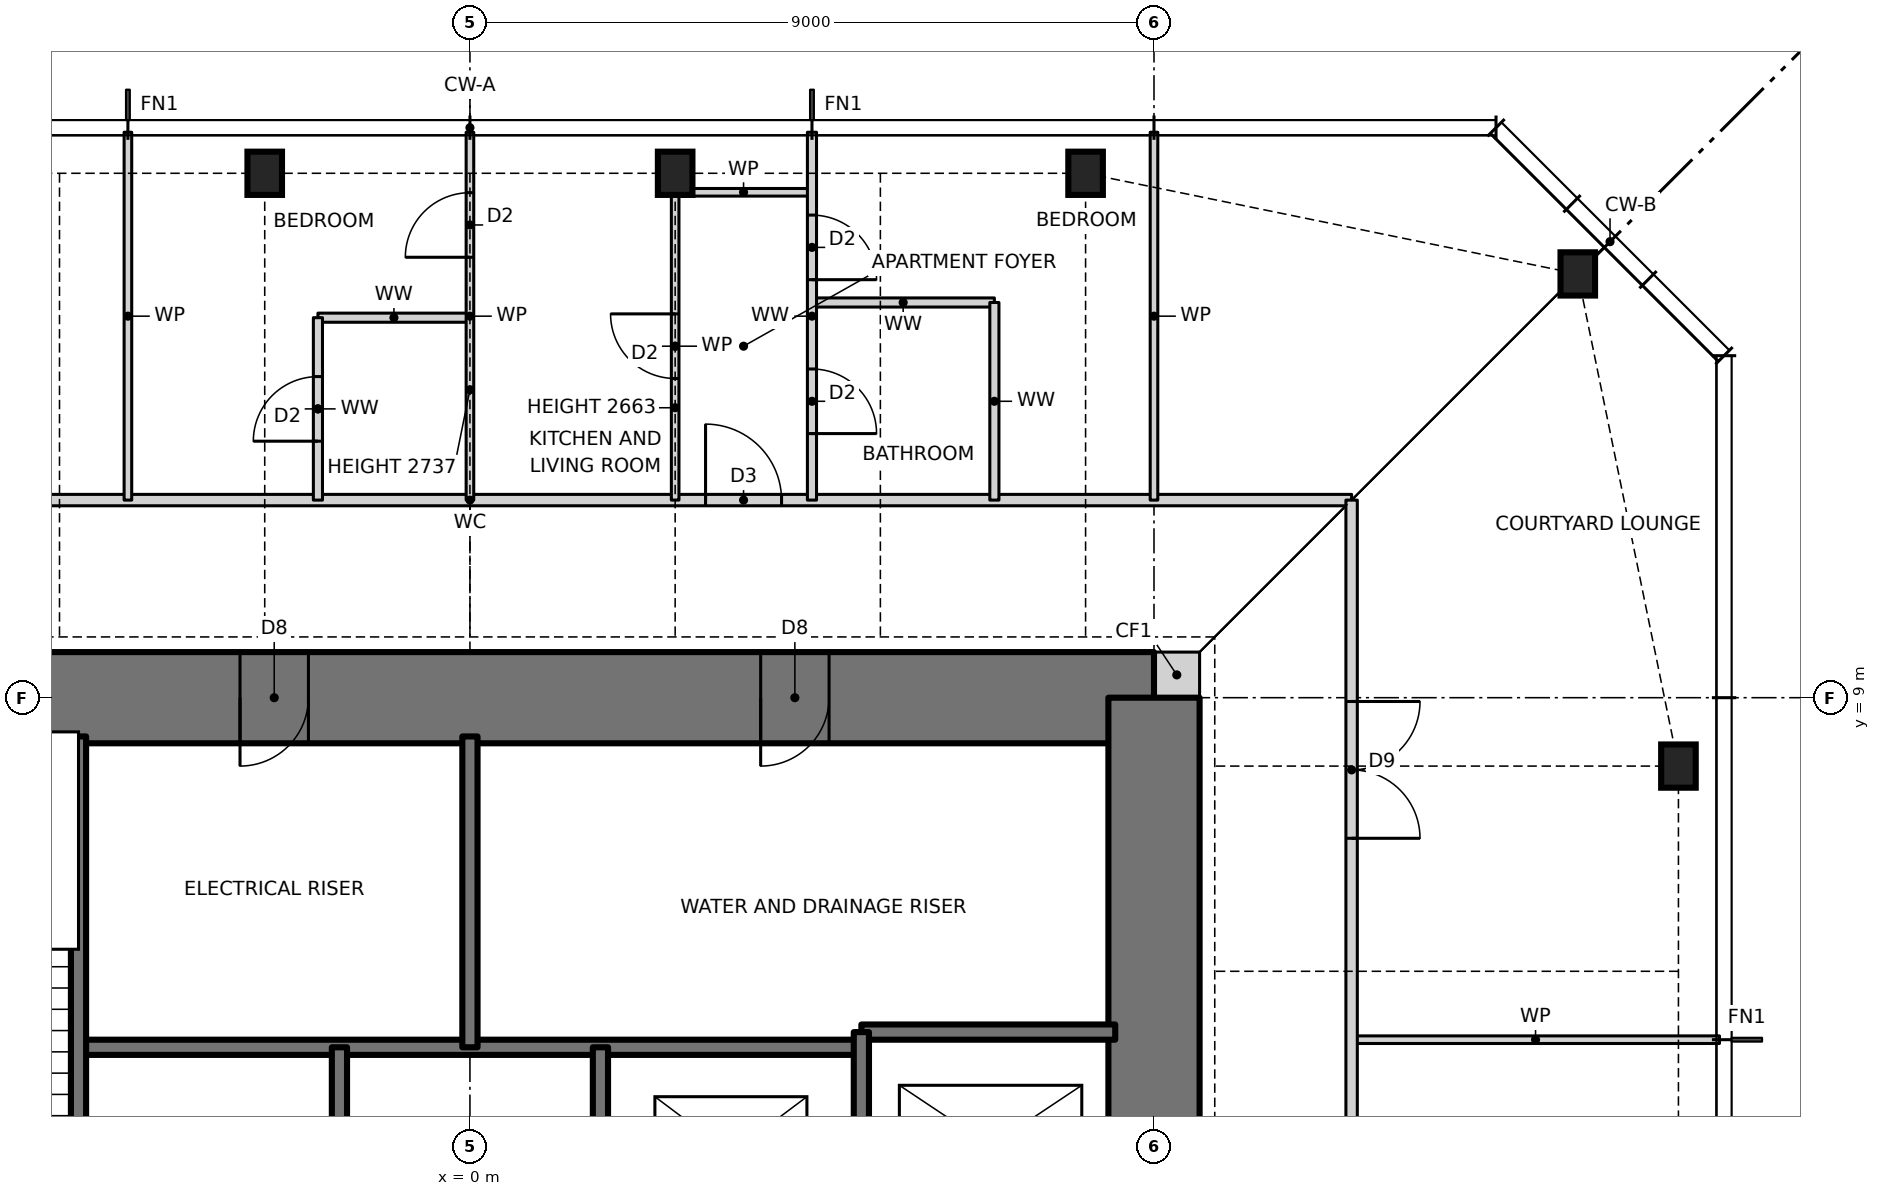
"""IFC4 building model, lengths in metres.
Left out: names, types, materials, properties, quantities, classifications, styles, units other than length and angle.
Written with IfcOpenShell. Run it as: python <this file> out.ifc"""

import sys

from ifc_helpers import new_model, si_unit, direction, frame, frame_2d, origin, origin_2d, place, context, subcontext, project, spatial, rectangle, i_section, extrude, element, fill, save


model = new_model("IFC4")
c1 = context("Model", 3, precision=1e-05, world=origin(), true_north=direction((0.0, 1.0)))
c2 = subcontext(c1, "Body", "Model", "MODEL_VIEW")
j1 = project(units=[si_unit("LENGTHUNIT", "METRE"), si_unit("PLANEANGLEUNIT", "RADIAN")], contexts=[c1])
p1 = place(None, origin())
s1 = spatial("IfcSite", under=j1, at=p1, CompositionType="ELEMENT")
p2 = place(p1, origin())
s2 = spatial("IfcBuilding", under=s1, at=p2, CompositionType="ELEMENT")
p3 = place(p2, frame((0.0, 0.0, 257.0)))
s3 = spatial("IfcBuildingStorey", under=s2, at=p3, CompositionType="ELEMENT", Elevation=257.0)
for number, where, z_axis, x_axis in (
    (1, (15.9, 8.1, 0.0), (0.0, 0.0, 1.0), (1.0, 0.0, 0.0)),
    (2, (14.576, 14.576, 0.0), (0.0, 0.0, 1.0), (1.0, 0.0, 0.0)),
    (3, (8.1, 15.9, 0.0), (0.0, 0.0, 1.0), (1.0, 0.0, 0.0)),
    (4, (2.7, 15.9, 0.0), (0.0, 0.0, 1.0), (1.0, 0.0, 0.0)),
    (5, (-2.7, 15.9, 0.0), (0.0, 0.0, 1.0), (1.0, 0.0, 0.0)),
):
    element("IfcColumn", number, at=place(p3, frame(where, z_axis=z_axis, x_axis=x_axis)), inside=s3, PredefinedType="COLUMN", context=c2, shape_type="SweptSolid", body=[
        extrude(i_section(OverallWidth=0.455, OverallDepth=0.569, WebThickness=0.078, FlangeThickness=0.125, at=origin_2d()), origin(), (0.0, 0.0, 1.0), 3.5),
    ])
p4 = place(p3, frame((9.0, 9.3, 0.0), z_axis=(0.0, 0.0, 1.0), x_axis=(1.0, 0.0, 0.0)))
e6 = element("IfcWall", 6, at=p4, inside=s3, PredefinedType="SOLIDWALL", context=c2, shape_type="SweptSolid", body=[
    extrude(rectangle(XDim=0.6, YDim=0.6, at=frame_2d((0.3, 0.0))), origin(), (0.0, 0.0, 1.0), 3.5),
])
p5 = place(p3, frame((9.0, 9.0, 0.0), z_axis=(0.0, 0.0, 1.0), x_axis=(-1.0, 0.0, 0.0)))
e7 = element("IfcWall", 7, at=p5, inside=s3, PredefinedType="SHEAR", context=c2, shape_type="SweptSolid", body=[
    extrude(rectangle(XDim=18.0, YDim=1.2, at=frame_2d((9.0, 0.0))), origin(), (0.0, 0.0, 1.0), 3.5),
])
p6 = place(p5, frame((11.125, 0.0, 0.0)))
e8 = element("IfcOpeningElement", 8, at=p6, cuts=e7, PredefinedType="OPENING", context=c2, shape_type="SweptSolid", body=[
    extrude(rectangle(XDim=0.9, YDim=2.1, at=frame_2d((0.45, 1.05))), frame((0.0, 0.61, 0.0), z_axis=(0.0, -1.0, 0.0), x_axis=(1.0, 0.0, 0.0)), (0.0, 0.0, 1.0), 1.22),
])
p7 = place(p5, frame((4.275, 0.0, 0.0)))
e9 = element("IfcOpeningElement", 9, at=p7, cuts=e7, PredefinedType="OPENING", context=c2, shape_type="SweptSolid", body=[
    extrude(rectangle(XDim=0.9, YDim=2.1, at=frame_2d((0.45, 1.05))), frame((0.0, 0.61, 0.0), z_axis=(0.0, -1.0, 0.0), x_axis=(1.0, 0.0, 0.0)), (0.0, 0.0, 1.0), 1.22),
])
p8 = place(p3, frame((9.0, -9.0, 0.0), z_axis=(0.0, 0.0, 1.0), x_axis=(0.0, 1.0, 0.0)))
e10 = element("IfcWall", 10, at=p8, inside=s3, PredefinedType="SHEAR", context=c2, shape_type="SweptSolid", body=[
    extrude(rectangle(XDim=18.0, YDim=1.2, at=frame_2d((9.0, 0.0))), origin(), (0.0, 0.0, 1.0), 3.5),
])
p9 = place(p8, frame((8.5, 0.0, 0.0)))
e11 = element("IfcOpeningElement", 11, at=p9, cuts=e10, PredefinedType="OPENING", context=c2, shape_type="SweptSolid", body=[
    extrude(rectangle(XDim=1.0, YDim=2.1, at=frame_2d((0.5, 1.05))), frame((0.0, 0.61, 0.0), z_axis=(0.0, -1.0, 0.0), x_axis=(1.0, 0.0, 0.0)), (0.0, 0.0, 1.0), 1.22),
])
p10 = place(p3, frame((-5.15, 4.4, 0.0), z_axis=(0.0, 0.0, 1.0), x_axis=(1.0, 0.0, 0.0)))
e12 = element("IfcWall", 12, at=p10, inside=s3, PredefinedType="SOLIDWALL", context=c2, shape_type="SweptSolid", body=[
    extrude(rectangle(XDim=10.3, YDim=0.2, at=frame_2d((5.15, 0.0))), origin(), (0.0, 0.0, 1.0), 3.5),
])
p11 = place(p3, frame((11.6, 4.5, 0.0), z_axis=(0.0, 0.0, 1.0), x_axis=(1.0, 0.0, 0.0)))
e13 = element("IfcWall", 13, at=p11, inside=s3, PredefinedType="PARTITIONING", context=c2, shape_type="SweptSolid", body=[
    extrude(rectangle(XDim=4.84, YDim=0.1, at=frame_2d((2.42, 0.0))), origin(), (0.0, 0.0, 1.0), 3.27),
])
p12 = place(p3, frame((5.15, 4.6, 0.0), z_axis=(0.0, 0.0, 1.0), x_axis=(1.0, 0.0, 0.0)))
e14 = element("IfcWall", 14, at=p12, inside=s3, PredefinedType="SOLIDWALL", context=c2, shape_type="SweptSolid", body=[
    extrude(rectangle(XDim=3.34, YDim=0.2, at=frame_2d((1.67, 0.0))), origin(), (0.0, 0.0, 1.0), 3.5),
])
p13 = place(p3, frame((-11.6, 11.6, 0.0), z_axis=(0.0, 0.0, 1.0), x_axis=(1.0, 0.0, 0.0)))
e15 = element("IfcWall", 15, at=p13, inside=s3, PredefinedType="PARTITIONING", context=c2, shape_type="SweptSolid", body=[
    extrude(rectangle(XDim=23.2, YDim=0.15, at=frame_2d((11.6, 0.0))), origin(), (0.0, 0.0, 1.0), 3.27),
])
p14 = place(p13, frame((14.7, 0.0, 0.0)))
e16 = element("IfcOpeningElement", 16, at=p14, cuts=e15, PredefinedType="OPENING", context=c2, shape_type="SweptSolid", body=[
    extrude(rectangle(XDim=1.0, YDim=2.1, at=frame_2d((0.5, 1.05))), frame((0.0, 0.085, 0.0), z_axis=(0.0, -1.0, 0.0), x_axis=(1.0, 0.0, 0.0)), (0.0, 0.0, 1.0), 0.17),
])
p15 = place(p13, frame((2.65, 0.0, 0.0)))
e17 = element("IfcOpeningElement", 17, at=p15, cuts=e15, PredefinedType="OPENING", context=c2, shape_type="SweptSolid", body=[
    extrude(rectangle(XDim=1.8, YDim=2.1, at=frame_2d((0.9, 1.05))), frame((0.0, 0.085, 0.0), z_axis=(0.0, -1.0, 0.0), x_axis=(1.0, 0.0, 0.0)), (0.0, 0.0, 1.0), 0.17),
])
p16 = place(p3, frame((-2.0, 14.0, 0.0), z_axis=(0.0, 0.0, 1.0), x_axis=(1.0, 0.0, 0.0)))
e18 = element("IfcWall", 18, at=p16, inside=s3, PredefinedType="PARTITIONING", context=c2, shape_type="SweptSolid", body=[
    extrude(rectangle(XDim=2.0, YDim=0.12, at=frame_2d((1.0, 0.0))), origin(), (0.0, 0.0, 1.0), 3.27),
])
p17 = place(p3, frame((4.5, 14.2, 0.0), z_axis=(0.0, 0.0, 1.0), x_axis=(1.0, 0.0, 0.0)))
e19 = element("IfcWall", 19, at=p17, inside=s3, PredefinedType="PARTITIONING", context=c2, shape_type="SweptSolid", body=[
    extrude(rectangle(XDim=2.4, YDim=0.12, at=frame_2d((1.2, 0.0))), origin(), (0.0, 0.0, 1.0), 3.27),
])
p18 = place(p3, frame((2.7, 15.65, 0.0), z_axis=(0.0, 0.0, 1.0), x_axis=(1.0, 0.0, 0.0)))
e20 = element("IfcWall", 20, at=p18, inside=s3, PredefinedType="PARTITIONING", context=c2, shape_type="SweptSolid", body=[
    extrude(rectangle(XDim=1.8, YDim=0.1, at=frame_2d((0.9, 0.0))), origin(), (0.0, 0.0, 1.0), 3.27),
])
p19 = place(p3, frame((11.6, -11.6, 0.0), z_axis=(0.0, 0.0, 1.0), x_axis=(0.0, 1.0, 0.0)))
e21 = element("IfcWall", 21, at=p19, inside=s3, PredefinedType="PARTITIONING", context=c2, shape_type="SweptSolid", body=[
    extrude(rectangle(XDim=23.2, YDim=0.15, at=frame_2d((11.6, 0.0))), origin(), (0.0, 0.0, 1.0), 3.27),
])
p20 = place(p19, frame((5.55, 0.0, 0.0)))
e22 = element("IfcOpeningElement", 22, at=p20, cuts=e21, PredefinedType="OPENING", context=c2, shape_type="SweptSolid", body=[
    extrude(rectangle(XDim=1.0, YDim=2.1, at=frame_2d((0.5, 1.05))), frame((0.0, 0.085, 0.0), z_axis=(0.0, -1.0, 0.0), x_axis=(1.0, 0.0, 0.0)), (0.0, 0.0, 1.0), 0.17),
])
p21 = place(p19, frame((7.65, 0.0, 0.0)))
e23 = element("IfcOpeningElement", 23, at=p21, cuts=e21, PredefinedType="OPENING", context=c2, shape_type="SweptSolid", body=[
    extrude(rectangle(XDim=1.0, YDim=2.1, at=frame_2d((0.5, 1.05))), frame((0.0, 0.085, 0.0), z_axis=(0.0, -1.0, 0.0), x_axis=(1.0, 0.0, 0.0)), (0.0, 0.0, 1.0), 0.17),
])
p22 = place(p19, frame((12.95, 0.0, 0.0)))
e24 = element("IfcOpeningElement", 24, at=p22, cuts=e21, PredefinedType="OPENING", context=c2, shape_type="SweptSolid", body=[
    extrude(rectangle(XDim=1.8, YDim=2.1, at=frame_2d((0.9, 1.05))), frame((0.0, 0.085, 0.0), z_axis=(0.0, -1.0, 0.0), x_axis=(1.0, 0.0, 0.0)), (0.0, 0.0, 1.0), 0.17),
])
p23 = place(p19, frame((18.75, 0.0, 0.0)))
e25 = element("IfcOpeningElement", 25, at=p23, cuts=e21, PredefinedType="OPENING", context=c2, shape_type="SweptSolid", body=[
    extrude(rectangle(XDim=1.8, YDim=2.1, at=frame_2d((0.9, 1.05))), frame((0.0, 0.085, 0.0), z_axis=(0.0, -1.0, 0.0), x_axis=(1.0, 0.0, 0.0)), (0.0, 0.0, 1.0), 0.17),
])
p24 = place(p3, frame((9.0, 11.6, 0.0), z_axis=(0.0, 0.0, 1.0), x_axis=(0.0, 1.0, 0.0)))
e26 = element("IfcWall", 26, at=p24, inside=s3, PredefinedType="PARTITIONING", context=c2, shape_type="SweptSolid", body=[
    extrude(rectangle(XDim=4.84, YDim=0.1, at=frame_2d((2.42, 0.0))), origin(), (0.0, 0.0, 1.0), 3.27),
])
p25 = place(p3, frame((6.9, 11.6, 0.0), z_axis=(0.0, 0.0, 1.0), x_axis=(0.0, 1.0, 0.0)))
e27 = element("IfcWall", 27, at=p25, inside=s3, PredefinedType="PARTITIONING", context=c2, shape_type="SweptSolid", body=[
    extrude(rectangle(XDim=2.6, YDim=0.12, at=frame_2d((1.3, 0.0))), origin(), (0.0, 0.0, 1.0), 3.27),
])
p26 = place(p3, frame((5.15, -8.49, 0.0), z_axis=(0.0, 0.0, 1.0), x_axis=(0.0, 1.0, 0.0)))
e28 = element("IfcWall", 28, at=p26, inside=s3, PredefinedType="SOLIDWALL", context=c2, shape_type="SweptSolid", body=[
    extrude(rectangle(XDim=13.09, YDim=0.2, at=frame_2d((6.545, 0.0))), origin(), (0.0, 0.0, 1.0), 3.5),
])
p27 = place(p26, frame((7.89, 0.0, 0.0)))
e29 = element("IfcOpeningElement", 29, at=p27, cuts=e28, PredefinedType="OPENING", context=c2, shape_type="SweptSolid", body=[
    extrude(rectangle(XDim=1.2, YDim=2.1, at=frame_2d((0.6, 1.05))), frame((0.0, 0.11, 0.0), z_axis=(0.0, -1.0, 0.0), x_axis=(1.0, 0.0, 0.0)), (0.0, 0.0, 1.0), 0.22),
])
p28 = place(p3, frame((4.5, 11.6, 0.0), z_axis=(0.0, 0.0, 1.0), x_axis=(0.0, 1.0, 0.0)))
e30 = element("IfcWall", 30, at=p28, inside=s3, PredefinedType="PARTITIONING", context=c2, shape_type="SweptSolid", body=[
    extrude(rectangle(XDim=4.84, YDim=0.12, at=frame_2d((2.42, 0.0))), origin(), (0.0, 0.0, 1.0), 3.27),
])
p29 = place(p28, frame((2.9, 0.0, 0.0)))
e31 = element("IfcOpeningElement", 31, at=p29, cuts=e30, PredefinedType="OPENING", context=c2, shape_type="SweptSolid", body=[
    extrude(rectangle(XDim=0.85, YDim=2.1, at=frame_2d((0.425, 1.05))), frame((0.0, 0.07, 0.0), z_axis=(0.0, -1.0, 0.0), x_axis=(1.0, 0.0, 0.0)), (0.0, 0.0, 1.0), 0.14),
])
p30 = place(p28, frame((0.875, 0.0, 0.0)))
e32 = element("IfcOpeningElement", 32, at=p30, cuts=e30, PredefinedType="OPENING", context=c2, shape_type="SweptSolid", body=[
    extrude(rectangle(XDim=0.85, YDim=2.1, at=frame_2d((0.425, 1.05))), frame((0.0, 0.07, 0.0), z_axis=(0.0, -1.0, 0.0), x_axis=(1.0, 0.0, 0.0)), (0.0, 0.0, 1.0), 0.14),
])
p31 = place(p3, frame((2.7, 11.6, 0.0), z_axis=(0.0, 0.0, 1.0), x_axis=(0.0, 1.0, 0.0)))
e33 = element("IfcWall", 33, at=p31, inside=s3, PredefinedType="PARTITIONING", context=c2, shape_type="SweptSolid", body=[
    extrude(rectangle(XDim=4.05, YDim=0.1, at=frame_2d((2.025, 0.0))), origin(), (0.0, 0.0, 1.0), 2.663),
])
p32 = place(p31, frame((1.6, 0.0, 0.0)))
e34 = element("IfcOpeningElement", 34, at=p32, cuts=e33, PredefinedType="OPENING", context=c2, shape_type="SweptSolid", body=[
    extrude(rectangle(XDim=0.85, YDim=2.1, at=frame_2d((0.425, 1.05))), frame((0.0, 0.06, 0.0), z_axis=(0.0, -1.0, 0.0), x_axis=(1.0, 0.0, 0.0)), (0.0, 0.0, 1.0), 0.12),
])
p33 = place(p3, frame((1.717, 1.6, 0.0), z_axis=(0.0, 0.0, 1.0), x_axis=(0.0, 1.0, 0.0)))
e35 = element("IfcWall", 35, at=p33, inside=s3, PredefinedType="SOLIDWALL", context=c2, shape_type="SweptSolid", body=[
    extrude(rectangle(XDim=2.8, YDim=0.2, at=frame_2d((1.4, 0.0))), origin(), (0.0, 0.0, 1.0), 3.5),
])
p34 = place(p3, frame((0.0, 4.4, 0.0), z_axis=(0.0, 0.0, 1.0), x_axis=(0.0, 1.0, 0.0)))
e36 = element("IfcWall", 36, at=p34, inside=s3, PredefinedType="SOLIDWALL", context=c2, shape_type="SweptSolid", body=[
    extrude(rectangle(XDim=4.09, YDim=0.2, at=frame_2d((2.045, 0.0))), origin(), (0.0, 0.0, 1.0), 3.5),
])
p35 = place(p3, frame((0.0, 11.6, 0.0), z_axis=(0.0, 0.0, 1.0), x_axis=(0.0, 1.0, 0.0)))
e37 = element("IfcWall", 37, at=p35, inside=s3, PredefinedType="PARTITIONING", context=c2, shape_type="SweptSolid", body=[
    extrude(rectangle(XDim=4.84, YDim=0.1, at=frame_2d((2.42, 0.0))), origin(), (0.0, 0.0, 1.0), 2.737),
])
p36 = place(p35, frame((3.195, 0.0, 0.0)))
e38 = element("IfcOpeningElement", 38, at=p36, cuts=e37, PredefinedType="OPENING", context=c2, shape_type="SweptSolid", body=[
    extrude(rectangle(XDim=0.85, YDim=2.1, at=frame_2d((0.425, 1.05))), frame((0.0, 0.06, 0.0), z_axis=(0.0, -1.0, 0.0), x_axis=(1.0, 0.0, 0.0)), (0.0, 0.0, 1.0), 0.12),
])
p37 = place(p3, frame((-1.717, 1.6, 0.0), z_axis=(0.0, 0.0, 1.0), x_axis=(0.0, 1.0, 0.0)))
e39 = element("IfcWall", 39, at=p37, inside=s3, PredefinedType="SOLIDWALL", context=c2, shape_type="SweptSolid", body=[
    extrude(rectangle(XDim=2.8, YDim=0.2, at=frame_2d((1.4, 0.0))), origin(), (0.0, 0.0, 1.0), 3.5),
])
p38 = place(p3, frame((-2.0, 11.6, 0.0), z_axis=(0.0, 0.0, 1.0), x_axis=(0.0, 1.0, 0.0)))
e40 = element("IfcWall", 40, at=p38, inside=s3, PredefinedType="PARTITIONING", context=c2, shape_type="SweptSolid", body=[
    extrude(rectangle(XDim=2.4, YDim=0.12, at=frame_2d((1.2, 0.0))), origin(), (0.0, 0.0, 1.0), 3.27),
])
p39 = place(p38, frame((0.775, 0.0, 0.0)))
e41 = element("IfcOpeningElement", 41, at=p39, cuts=e40, PredefinedType="OPENING", context=c2, shape_type="SweptSolid", body=[
    extrude(rectangle(XDim=0.85, YDim=2.1, at=frame_2d((0.425, 1.05))), frame((0.0, 0.07, 0.0), z_axis=(0.0, -1.0, 0.0), x_axis=(1.0, 0.0, 0.0)), (0.0, 0.0, 1.0), 0.14),
])
p40 = place(p3, frame((-4.5, 11.6, 0.0), z_axis=(0.0, 0.0, 1.0), x_axis=(0.0, 1.0, 0.0)))
e42 = element("IfcWall", 42, at=p40, inside=s3, PredefinedType="PARTITIONING", context=c2, shape_type="SweptSolid", body=[
    extrude(rectangle(XDim=4.84, YDim=0.1, at=frame_2d((2.42, 0.0))), origin(), (0.0, 0.0, 1.0), 3.27),
])
p41 = place(p3, frame((-5.15, 1.6, 0.0), z_axis=(0.0, 0.0, 1.0), x_axis=(0.0, 1.0, 0.0)))
e43 = element("IfcWall", 43, at=p41, inside=s3, PredefinedType="SOLIDWALL", context=c2, shape_type="SweptSolid", body=[
    extrude(rectangle(XDim=6.89, YDim=0.2, at=frame_2d((3.445, 0.0))), origin(), (0.0, 0.0, 1.0), 3.5),
])
p42 = place(p14, origin())
e44 = element("IfcDoor", 44, at=p42, inside=s3, OperationType="SINGLE_SWING_LEFT", PredefinedType="DOOR", context=c2, shape_type="SweptSolid", body=[
    extrude(rectangle(XDim=1.0, YDim=2.1, at=frame_2d((0.5, 1.05))), frame((0.0, 0.025, 0.0), z_axis=(0.0, -1.0, 0.0), x_axis=(1.0, 0.0, 0.0)), (0.0, 0.0, 1.0), 0.05),
])
fill(e16, e44)
p43 = place(p32, origin())
e45 = element("IfcDoor", 45, at=p43, inside=s3, OperationType="SINGLE_SWING_RIGHT", PredefinedType="DOOR", context=c2, shape_type="SweptSolid", body=[
    extrude(rectangle(XDim=0.85, YDim=2.1, at=frame_2d((0.425, 1.05))), frame((0.0, 0.025, 0.0), z_axis=(0.0, -1.0, 0.0), x_axis=(1.0, 0.0, 0.0)), (0.0, 0.0, 1.0), 0.05),
])
fill(e34, e45)
p44 = place(p29, frame((0.85, 0.0, 0.0), z_axis=(0.0, 0.0, 1.0), x_axis=(-1.0, 0.0, 0.0)))
e46 = element("IfcDoor", 46, at=p44, inside=s3, OperationType="SINGLE_SWING_RIGHT", PredefinedType="DOOR", context=c2, shape_type="SweptSolid", body=[
    extrude(rectangle(XDim=0.85, YDim=2.1, at=frame_2d((0.425, 1.05))), frame((0.0, 0.025, 0.0), z_axis=(0.0, -1.0, 0.0), x_axis=(1.0, 0.0, 0.0)), (0.0, 0.0, 1.0), 0.05),
])
fill(e31, e46)
p45 = place(p30, frame((0.85, 0.0, 0.0), z_axis=(0.0, 0.0, 1.0), x_axis=(-1.0, 0.0, 0.0)))
e47 = element("IfcDoor", 47, at=p45, inside=s3, OperationType="SINGLE_SWING_RIGHT", PredefinedType="DOOR", context=c2, shape_type="SweptSolid", body=[
    extrude(rectangle(XDim=0.85, YDim=2.1, at=frame_2d((0.425, 1.05))), frame((0.0, 0.025, 0.0), z_axis=(0.0, -1.0, 0.0), x_axis=(1.0, 0.0, 0.0)), (0.0, 0.0, 1.0), 0.05),
])
fill(e32, e47)
p46 = place(p36, origin())
e48 = element("IfcDoor", 48, at=p46, inside=s3, OperationType="SINGLE_SWING_LEFT", PredefinedType="DOOR", context=c2, shape_type="SweptSolid", body=[
    extrude(rectangle(XDim=0.85, YDim=2.1, at=frame_2d((0.425, 1.05))), frame((0.0, 0.025, 0.0), z_axis=(0.0, -1.0, 0.0), x_axis=(1.0, 0.0, 0.0)), (0.0, 0.0, 1.0), 0.05),
])
fill(e38, e48)
p47 = place(p39, origin())
e49 = element("IfcDoor", 49, at=p47, inside=s3, OperationType="SINGLE_SWING_LEFT", PredefinedType="DOOR", context=c2, shape_type="SweptSolid", body=[
    extrude(rectangle(XDim=0.85, YDim=2.1, at=frame_2d((0.425, 1.05))), frame((0.0, 0.025, 0.0), z_axis=(0.0, -1.0, 0.0), x_axis=(1.0, 0.0, 0.0)), (0.0, 0.0, 1.0), 0.05),
])
fill(e41, e49)
p48 = place(p23, frame((1.8, 0.0, 0.0), z_axis=(0.0, 0.0, 1.0), x_axis=(-1.0, 0.0, 0.0)))
e50 = element("IfcDoor", 50, at=p48, inside=s3, OperationType="DOUBLE_DOOR_SINGLE_SWING", PredefinedType="DOOR", context=c2, shape_type="SweptSolid", body=[
    extrude(rectangle(XDim=1.8, YDim=2.1, at=frame_2d((0.9, 1.05))), frame((0.0, 0.025, 0.0), z_axis=(0.0, -1.0, 0.0), x_axis=(1.0, 0.0, 0.0)), (0.0, 0.0, 1.0), 0.05),
])
fill(e25, e50)
p49 = place(p6, origin())
e51 = element("IfcDoor", 51, at=p49, inside=s3, OperationType="SINGLE_SWING_RIGHT", PredefinedType="DOOR", context=c2, shape_type="SweptSolid", body=[
    extrude(rectangle(XDim=0.9, YDim=2.1, at=frame_2d((0.45, 1.05))), frame((0.0, 0.025, 0.0), z_axis=(0.0, -1.0, 0.0), x_axis=(1.0, 0.0, 0.0)), (0.0, 0.0, 1.0), 0.05),
])
fill(e8, e51)
p50 = place(p7, origin())
e52 = element("IfcDoor", 52, at=p50, inside=s3, OperationType="SINGLE_SWING_RIGHT", PredefinedType="DOOR", context=c2, shape_type="SweptSolid", body=[
    extrude(rectangle(XDim=0.9, YDim=2.1, at=frame_2d((0.45, 1.05))), frame((0.0, 0.025, 0.0), z_axis=(0.0, -1.0, 0.0), x_axis=(1.0, 0.0, 0.0)), (0.0, 0.0, 1.0), 0.05),
])
fill(e9, e52)
save(model, sys.argv[1])
